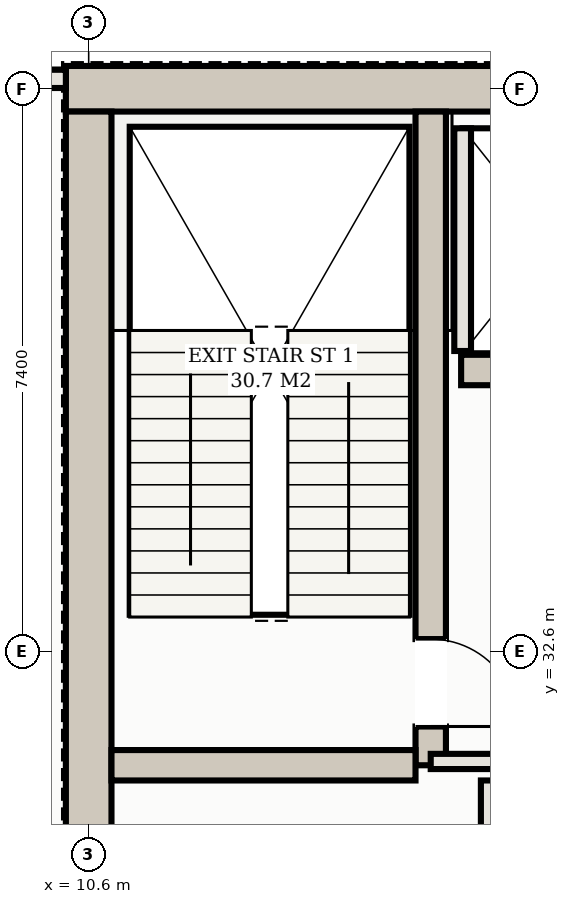
"""IFC4 building model, lengths in metres.
Left out: names, types, materials, properties, quantities, classifications, styles, units other than length and angle.
Written with IfcOpenShell. Run it as: python <this file> out.ifc"""

import sys

from ifc_helpers import new_model, si_unit, direction, frame, frame_2d, origin, place, context, subcontext, project, spatial, rectangle, extrude, element, fill, save


model = new_model("IFC4")
c1 = context("Model", 3, precision=1e-05, world=origin(), true_north=direction((0.0, 1.0)))
c2 = subcontext(c1, "Body", "Model", "MODEL_VIEW")
j1 = project(units=[si_unit("LENGTHUNIT", "METRE"), si_unit("PLANEANGLEUNIT", "RADIAN")], contexts=[c1])
p1 = place(None, origin())
s1 = spatial("IfcSite", under=j1, at=p1, CompositionType="ELEMENT")
p2 = place(p1, origin())
s2 = spatial("IfcBuilding", under=s1, at=p2, CompositionType="ELEMENT")
p3 = place(p2, frame((0.0, 0.0, 134.7)))
s3 = spatial("IfcBuildingStorey", under=s2, at=p3, CompositionType="ELEMENT", Elevation=134.7)
p4 = place(p3, frame((10.3, 40.0, 0.0), z_axis=(0.0, 0.0, 1.0), x_axis=(1.0, 0.0, 0.0)))
e1 = element("IfcWall", 1, at=p4, inside=s3, PredefinedType="SHEAR", context=c2, shape_type="SweptSolid", body=[
    extrude(rectangle(XDim=32.4, YDim=0.6, at=frame_2d((16.2, 0.0))), origin(), (0.0, 0.0, 1.0), 4.3),
])
p5 = place(p3, frame((10.6, 25.5, 0.0), z_axis=(0.0, 0.0, 1.0), x_axis=(0.0, 1.0, 0.0)))
e2 = element("IfcWall", 2, at=p5, inside=s3, PredefinedType="SHEAR", context=c2, shape_type="SweptSolid", body=[
    extrude(rectangle(XDim=14.2, YDim=0.6, at=frame_2d((7.1, 0.0))), origin(), (0.0, 0.0, 1.0), 4.3),
])
p6 = place(p3, frame((15.1, 31.1, 0.0), z_axis=(0.0, 0.0, 1.0), x_axis=(0.0, 1.0, 0.0)))
e3 = element("IfcWall", 3, at=p6, inside=s3, PredefinedType="SHEAR", context=c2, shape_type="SweptSolid", body=[
    extrude(rectangle(XDim=8.6, YDim=0.4, at=frame_2d((4.3, 0.0))), origin(), (0.0, 0.0, 1.0), 4.3),
])
p7 = place(p6, frame((0.51, 0.0, 0.0)))
e4 = element("IfcOpeningElement", 4, at=p7, cuts=e3, PredefinedType="OPENING", context=c2, shape_type="SweptSolid", body=[
    extrude(rectangle(XDim=1.15, YDim=2.2, at=frame_2d((0.575, 1.1))), frame((0.0, 0.21, 0.0), z_axis=(0.0, -1.0, 0.0), x_axis=(1.0, 0.0, 0.0)), (0.0, 0.0, 1.0), 0.42),
])
p8 = place(p3, frame((10.9, 31.1, 0.0), z_axis=(0.0, 0.0, 1.0), x_axis=(1.0, 0.0, 0.0)))
e5 = element("IfcWall", 5, at=p8, inside=s3, PredefinedType="SHEAR", context=c2, shape_type="SweptSolid", body=[
    extrude(rectangle(XDim=4.0, YDim=0.4, at=frame_2d((2.0, 0.0))), origin(), (0.0, 0.0, 1.0), 4.3),
])
p9 = place(p3, frame((15.5, 36.3, 0.0), z_axis=(0.0, 0.0, 1.0), x_axis=(1.0, 0.0, 0.0)))
e6 = element("IfcWall", 6, at=p9, inside=s3, PredefinedType="SHEAR", context=c2, shape_type="SweptSolid", body=[
    extrude(rectangle(XDim=22.0, YDim=0.4, at=frame_2d((11.0, 0.0))), origin(), (0.0, 0.0, 1.0), 4.3),
])
p10 = place(p9, frame((0.65, 0.0, 0.0)))
e7 = element("IfcOpeningElement", 7, at=p10, cuts=e6, PredefinedType="OPENING", context=c2, shape_type="SweptSolid", body=[
    extrude(rectangle(XDim=1.1, YDim=2.15, at=frame_2d((0.55, 1.075))), frame((0.0, 0.21, 0.0), z_axis=(0.0, -1.0, 0.0), x_axis=(1.0, 0.0, 0.0)), (0.0, 0.0, 1.0), 0.42),
])
p11 = place(p9, frame((20.25, 0.0, 0.0)))
e8 = element("IfcOpeningElement", 8, at=p11, cuts=e6, PredefinedType="OPENING", context=c2, shape_type="SweptSolid", body=[
    extrude(rectangle(XDim=1.1, YDim=2.15, at=frame_2d((0.55, 1.075))), frame((0.0, 0.21, 0.0), z_axis=(0.0, -1.0, 0.0), x_axis=(1.0, 0.0, 0.0)), (0.0, 0.0, 1.0), 0.42),
])
p12 = place(p9, frame((17.05, 0.0, 0.0)))
e9 = element("IfcOpeningElement", 9, at=p12, cuts=e6, PredefinedType="OPENING", context=c2, shape_type="SweptSolid", body=[
    extrude(rectangle(XDim=1.3, YDim=2.2, at=frame_2d((0.65, 1.1))), frame((0.0, 0.21, 0.0), z_axis=(0.0, -1.0, 0.0), x_axis=(1.0, 0.0, 0.0)), (0.0, 0.0, 1.0), 0.42),
])
p13 = place(p9, frame((3.95, 0.0, 0.0)))
e10 = element("IfcOpeningElement", 10, at=p13, cuts=e6, PredefinedType="OPENING", context=c2, shape_type="SweptSolid", body=[
    extrude(rectangle(XDim=1.1, YDim=2.15, at=frame_2d((0.55, 1.075))), frame((0.0, 0.21, 0.0), z_axis=(0.0, -1.0, 0.0), x_axis=(1.0, 0.0, 0.0)), (0.0, 0.0, 1.0), 0.42),
])
p14 = place(p9, frame((6.55, 0.0, 0.0)))
e11 = element("IfcOpeningElement", 11, at=p14, cuts=e6, PredefinedType="OPENING", context=c2, shape_type="SweptSolid", body=[
    extrude(rectangle(XDim=1.1, YDim=2.15, at=frame_2d((0.55, 1.075))), frame((0.0, 0.21, 0.0), z_axis=(0.0, -1.0, 0.0), x_axis=(1.0, 0.0, 0.0)), (0.0, 0.0, 1.0), 0.42),
])
p15 = place(p9, frame((9.15, 0.0, 0.0)))
e12 = element("IfcOpeningElement", 12, at=p15, cuts=e6, PredefinedType="OPENING", context=c2, shape_type="SweptSolid", body=[
    extrude(rectangle(XDim=1.1, YDim=2.15, at=frame_2d((0.55, 1.075))), frame((0.0, 0.21, 0.0), z_axis=(0.0, -1.0, 0.0), x_axis=(1.0, 0.0, 0.0)), (0.0, 0.0, 1.0), 0.42),
])
p16 = place(p3, frame((15.52, 36.55, 0.0), z_axis=(0.0, 0.0, 1.0), x_axis=(0.0, 1.0, 0.0)))
e13 = element("IfcWall", 13, at=p16, inside=s3, PredefinedType="SOLIDWALL", context=c2, shape_type="SweptSolid", body=[
    extrude(rectangle(XDim=2.93, YDim=0.22, at=frame_2d((1.465, 0.0))), origin(), (0.0, 0.0, 1.0), 4.3),
])
p17 = place(p3, frame((10.3, 40.13, 0.0), z_axis=(0.0, 0.0, 1.0), x_axis=(-1.0, 0.0, 0.0)))
e14 = element("IfcWall", 14, at=p17, inside=s3, PredefinedType="SOLIDWALL", context=c2, shape_type="SweptSolid", body=[
    extrude(rectangle(XDim=1.65, YDim=0.24, at=frame_2d((0.825, 0.0))), origin(), (0.0, 0.0, 1.0), 4.3),
])
p18 = place(p3, frame((15.1, 31.15, 0.0), z_axis=(0.0, 0.0, 1.0), x_axis=(1.0, 0.0, 0.0)))
e15 = element("IfcWall", 15, at=p18, inside=s3, PredefinedType="PARTITIONING", context=c2, shape_type="SweptSolid", body=[
    extrude(rectangle(XDim=3.25, YDim=0.2, at=frame_2d((1.625, 0.0))), origin(), (0.0, 0.0, 1.0), 4.3),
])
p19 = place(p18, frame((1.275, 0.0, 0.0)))
e16 = element("IfcOpeningElement", 16, at=p19, cuts=e15, PredefinedType="OPENING", context=c2, shape_type="SweptSolid", body=[
    extrude(rectangle(XDim=1.25, YDim=2.2, at=frame_2d((0.625, 1.1))), frame((0.0, 0.11, 0.0), z_axis=(0.0, -1.0, 0.0), x_axis=(1.0, 0.0, 0.0)), (0.0, 0.0, 1.0), 0.22),
])
p20 = place(p3, frame((15.85, 25.5, 0.0), z_axis=(0.0, 0.0, 1.0), x_axis=(0.0, 1.0, 0.0)))
e17 = element("IfcWall", 17, at=p20, inside=s3, PredefinedType="PARTITIONING", context=c2, shape_type="SweptSolid", body=[
    extrude(rectangle(XDim=5.4, YDim=0.18, at=frame_2d((2.7, 0.0))), origin(), (0.0, 0.0, 1.0), 4.3),
])
p21 = place(p20, frame((2.24, 0.0, 0.0)))
e18 = element("IfcOpeningElement", 18, at=p21, cuts=e17, PredefinedType="OPENING", context=c2, shape_type="SweptSolid", body=[
    extrude(rectangle(XDim=0.92, YDim=2.15, at=frame_2d((0.46, 1.075))), frame((0.0, 0.1, 0.0), z_axis=(0.0, -1.0, 0.0), x_axis=(1.0, 0.0, 0.0)), (0.0, 0.0, 1.0), 0.2),
])
p22 = place(p7, frame((1.15, 0.0, 0.0), z_axis=(0.0, 0.0, 1.0), x_axis=(-1.0, 0.0, 0.0)))
e19 = element("IfcDoor", 19, at=p22, inside=s3, OperationType="SINGLE_SWING_RIGHT", PredefinedType="DOOR", context=c2, shape_type="SweptSolid", body=[
    extrude(rectangle(XDim=1.15, YDim=2.2, at=frame_2d((0.575, 1.1))), frame((0.0, 0.025, 0.0), z_axis=(0.0, -1.0, 0.0), x_axis=(1.0, 0.0, 0.0)), (0.0, 0.0, 1.0), 0.05),
])
fill(e4, e19)
save(model, sys.argv[1])
